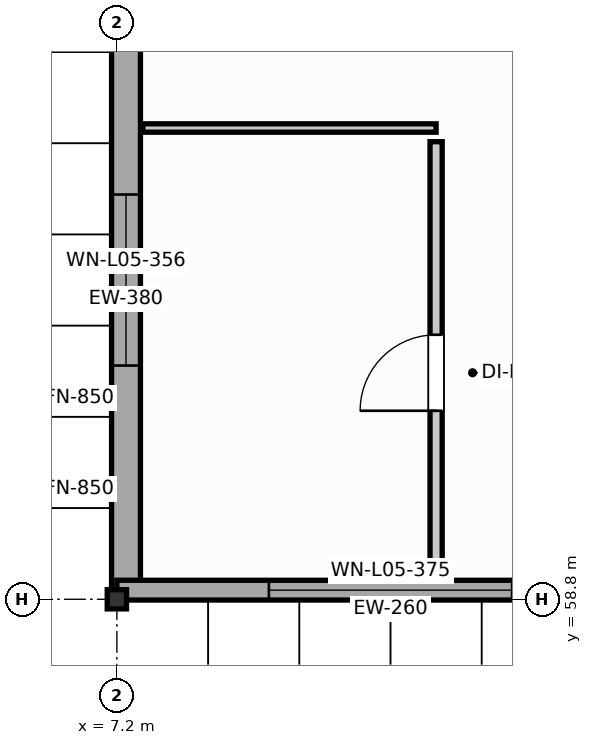
"""IFC4 building model, lengths in metres.
Left out: names, types, materials, properties, quantities, classifications, styles, units other than length and angle.
Written with IfcOpenShell. Run it as: python <this file> out.ifc"""

import sys

from ifc_helpers import new_model, si_unit, direction, frame, frame_2d, origin, origin_2d, place, context, subcontext, project, spatial, rectangle, i_section, extrude, element, fill, save


model = new_model("IFC4")
c1 = context("Model", 3, precision=1e-05, world=origin(), true_north=direction((0.0, 1.0)))
c2 = subcontext(c1, "Body", "Model", "MODEL_VIEW")
j1 = project(units=[si_unit("LENGTHUNIT", "METRE"), si_unit("PLANEANGLEUNIT", "RADIAN")], contexts=[c1])
p1 = place(None, origin())
s1 = spatial("IfcSite", under=j1, at=p1, CompositionType="ELEMENT")
p2 = place(p1, origin())
s2 = spatial("IfcBuilding", under=s1, at=p2, CompositionType="ELEMENT")
p3 = place(p2, frame((0.0, 0.0, 21.6)))
s3 = spatial("IfcBuildingStorey", under=s2, at=p3, CompositionType="ELEMENT", Elevation=21.6)
p4 = place(p3, frame((7.2, 58.8, 0.0), z_axis=(0.0, 0.0, 1.0), x_axis=(1.0, 0.0, 0.0)))
e1 = element("IfcColumn", 1, at=p4, inside=s3, PredefinedType="COLUMN", context=c2, shape_type="SweptSolid", body=[
    extrude(i_section(OverallWidth=0.254, OverallDepth=0.253, WebThickness=0.009, FlangeThickness=0.014, FilletRadius=0.013, at=origin_2d()), origin(), (0.0, 0.0, 1.0), 4.2),
])
p5 = place(p3, frame((7.32, 58.8, 0.0), z_axis=(0.0, 0.0, 1.0), x_axis=(0.0, 1.0, 0.0)))
e2 = element("IfcWall", 2, at=p5, inside=s3, PredefinedType="SOLIDWALL", context=c2, shape_type="SweptSolid", body=[
    extrude(rectangle(XDim=8.4, YDim=0.38, at=frame_2d((4.2, 0.0))), origin(), (0.0, 0.0, 1.0), 3.249),
])
p6 = place(p5, frame((3.075, 0.0, 0.95)))
e3 = element("IfcOpeningElement", 3, at=p6, cuts=e2, PredefinedType="OPENING", context=c2, shape_type="SweptSolid", body=[
    extrude(rectangle(XDim=2.25, YDim=1.75, at=frame_2d((1.125, 0.875))), frame((0.0, 0.2, 0.0), z_axis=(0.0, -1.0, 0.0), x_axis=(1.0, 0.0, 0.0)), (0.0, 0.0, 1.0), 0.4),
])
p7 = place(p3, frame((7.2, 58.92, 0.0), z_axis=(0.0, 0.0, 1.0), x_axis=(1.0, 0.0, 0.0)))
e4 = element("IfcWall", 4, at=p7, inside=s3, PredefinedType="SOLIDWALL", context=c2, shape_type="SweptSolid", body=[
    extrude(rectangle(XDim=7.2, YDim=0.26, at=frame_2d((3.6, 0.0))), origin(), (0.0, 0.0, 1.0), 3.482),
])
p8 = place(p7, frame((2.0, 0.0, 0.95)))
e5 = element("IfcOpeningElement", 5, at=p8, cuts=e4, PredefinedType="OPENING", context=c2, shape_type="SweptSolid", body=[
    extrude(rectangle(XDim=3.2, YDim=1.55, at=frame_2d((1.6, 0.775))), frame((0.0, 0.14, 0.0), z_axis=(0.0, -1.0, 0.0), x_axis=(1.0, 0.0, 0.0)), (0.0, 0.0, 1.0), 0.28),
])
p9 = place(p3, frame((7.54, 65.0, 0.0), z_axis=(0.0, 0.0, 1.0), x_axis=(1.0, 0.0, 0.0)))
e6 = element("IfcWall", 6, at=p9, inside=s3, PredefinedType="MOVABLE", context=c2, shape_type="SweptSolid", body=[
    extrude(rectangle(XDim=3.86, YDim=0.11, at=frame_2d((1.93, 0.0))), origin(), (0.0, 0.0, 1.0), 3.945),
])
p10 = place(p3, frame((11.4, 64.82, 0.0), z_axis=(0.0, 0.0, 1.0), x_axis=(0.0, -1.0, 0.0)))
e7 = element("IfcWall", 7, at=p10, inside=s3, PredefinedType="PARTITIONING", context=c2, shape_type="SweptSolid", body=[
    extrude(rectangle(XDim=5.68, YDim=0.16, at=frame_2d((2.84, 0.0))), origin(), (0.0, 0.0, 1.0), 3.945),
])
p11 = place(p10, frame((2.54, 0.0, 0.0)))
e8 = element("IfcOpeningElement", 8, at=p11, cuts=e7, PredefinedType="OPENING", context=c2, shape_type="SweptSolid", body=[
    extrude(rectangle(XDim=1.0, YDim=2.15, at=frame_2d((0.5, 1.075))), frame((0.0, 0.09, 0.0), z_axis=(0.0, -1.0, 0.0), x_axis=(1.0, 0.0, 0.0)), (0.0, 0.0, 1.0), 0.18),
])
p12 = place(p6, origin())
e9 = element("IfcWindow", 9, at=p12, inside=s3, PartitioningType="SINGLE_PANEL", PredefinedType="WINDOW", context=c2, shape_type="SweptSolid", body=[
    extrude(rectangle(XDim=2.25, YDim=1.75, at=frame_2d((1.125, 0.875))), frame((0.0, 0.03, 0.0), z_axis=(0.0, -1.0, 0.0), x_axis=(1.0, 0.0, 0.0)), (0.0, 0.0, 1.0), 0.06),
])
fill(e3, e9)
p13 = place(p8, origin())
e10 = element("IfcWindow", 10, at=p13, inside=s3, PartitioningType="SINGLE_PANEL", PredefinedType="WINDOW", context=c2, shape_type="SweptSolid", body=[
    extrude(rectangle(XDim=3.2, YDim=1.55, at=frame_2d((1.6, 0.775))), frame((0.0, 0.03, 0.0), z_axis=(0.0, -1.0, 0.0), x_axis=(1.0, 0.0, 0.0)), (0.0, 0.0, 1.0), 0.06),
])
fill(e5, e10)
p14 = place(p11, frame((1.0, 0.0, 0.0), z_axis=(0.0, 0.0, 1.0), x_axis=(-1.0, 0.0, 0.0)))
e11 = element("IfcDoor", 11, at=p14, inside=s3, OperationType="SINGLE_SWING_LEFT", PredefinedType="DOOR", context=c2, shape_type="SweptSolid", body=[
    extrude(rectangle(XDim=1.0, YDim=2.15, at=frame_2d((0.5, 1.075))), frame((0.0, 0.025, 0.0), z_axis=(0.0, -1.0, 0.0), x_axis=(1.0, 0.0, 0.0)), (0.0, 0.0, 1.0), 0.05),
])
fill(e8, e11)
save(model, sys.argv[1])
